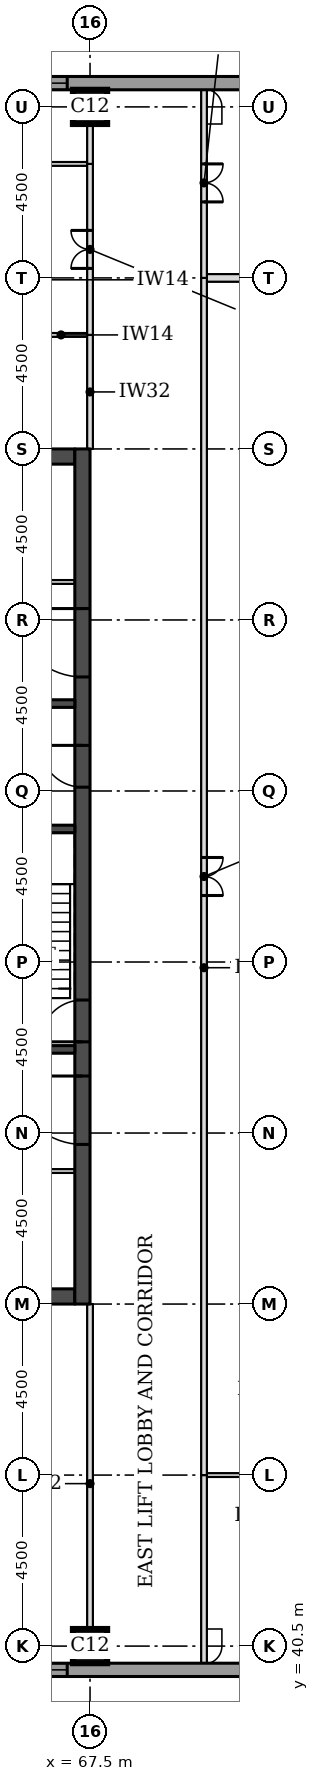
"""IFC4 building model, lengths in metres.
Left out: names, types, materials, properties, quantities, classifications, styles, units other than length and angle.
Written with IfcOpenShell. Run it as: python <this file> out.ifc"""

import sys

from ifc_helpers import new_model, si_unit, direction, frame, frame_2d, origin, origin_2d, place, context, subcontext, project, spatial, rectangle, extrude, element, fill, save


model = new_model("IFC4")
c1 = context("Model", 3, precision=1e-05, world=origin(), true_north=direction((0.0, 1.0)))
c2 = subcontext(c1, "Body", "Model", "MODEL_VIEW")
j1 = project(units=[si_unit("LENGTHUNIT", "METRE"), si_unit("PLANEANGLEUNIT", "RADIAN")], contexts=[c1])
p1 = place(None, origin())
s1 = spatial("IfcSite", under=j1, at=p1, CompositionType="ELEMENT")
p2 = place(p1, origin())
s2 = spatial("IfcBuilding", under=s1, at=p2, CompositionType="ELEMENT")
p3 = place(p2, frame((0.0, 0.0, 169.9)))
s3 = spatial("IfcBuildingStorey", under=s2, at=p3, CompositionType="ELEMENT", Elevation=169.9)
for number, where, z_axis, x_axis in (
    (1, (67.5, 40.5, 0.0), (0.0, 0.0, 1.0), (1.0, 0.0, 0.0)),
    (2, (67.5, 81.0, 0.0), (0.0, 0.0, 1.0), (1.0, 0.0, 0.0)),
):
    element("IfcColumn", number, at=place(p3, frame(where, z_axis=z_axis, x_axis=x_axis)), inside=s3, PredefinedType="COLUMN", context=c2, shape_type="SweptSolid", body=[
        extrude(rectangle(XDim=0.9, YDim=0.9, at=origin_2d()), origin(), (0.0, 0.0, 1.0), 3.7),
    ])
for number, where, z_axis, x_axis in (
    (3, (45.4, 49.7, 0.0), (0.0, 0.0, 1.0), (1.0, 0.0, 0.0)),
    (4, (45.4, 71.8, 0.0), (0.0, 0.0, 1.0), (1.0, 0.0, 0.0)),
):
    element("IfcWall", number, at=place(p3, frame(where, z_axis=z_axis, x_axis=x_axis)), inside=s3, PredefinedType="SHEAR", context=c2, shape_type="SweptSolid", body=[
        extrude(rectangle(XDim=21.7, YDim=0.4, at=frame_2d((10.85, 0.0))), origin(), (0.0, 0.0, 1.0), 3.7),
    ])
p4 = place(p3, frame((67.3, 49.5, 0.0), z_axis=(0.0, 0.0, 1.0), x_axis=(0.0, 1.0, 0.0)))
e5 = element("IfcWall", 5, at=p4, inside=s3, PredefinedType="SHEAR", context=c2, shape_type="SweptSolid", body=[
    extrude(rectangle(XDim=22.5, YDim=0.4, at=frame_2d((11.25, 0.0))), origin(), (0.0, 0.0, 1.0), 3.7),
])
p5 = place(p4, frame((4.2, 0.0, 0.0)))
e6 = element("IfcOpeningElement", 6, at=p5, cuts=e5, PredefinedType="OPENING", context=c2, shape_type="SweptSolid", body=[
    extrude(rectangle(XDim=1.8, YDim=2.1, at=frame_2d((0.9, 1.05))), frame((0.0, 0.21, 0.0), z_axis=(0.0, -1.0, 0.0), x_axis=(1.0, 0.0, 0.0)), (0.0, 0.0, 1.0), 0.42),
])
p6 = place(p4, frame((6.9, 0.0, 0.0)))
e7 = element("IfcOpeningElement", 7, at=p6, cuts=e5, PredefinedType="OPENING", context=c2, shape_type="SweptSolid", body=[
    extrude(rectangle(XDim=1.1, YDim=2.1, at=frame_2d((0.55, 1.05))), frame((0.0, 0.21, 0.0), z_axis=(0.0, -1.0, 0.0), x_axis=(1.0, 0.0, 0.0)), (0.0, 0.0, 1.0), 0.42),
])
p7 = place(p4, frame((13.6, 0.0, 0.0)))
e8 = element("IfcOpeningElement", 8, at=p7, cuts=e5, PredefinedType="OPENING", context=c2, shape_type="SweptSolid", body=[
    extrude(rectangle(XDim=1.1, YDim=2.1, at=frame_2d((0.55, 1.05))), frame((0.0, 0.21, 0.0), z_axis=(0.0, -1.0, 0.0), x_axis=(1.0, 0.0, 0.0)), (0.0, 0.0, 1.0), 0.42),
])
p8 = place(p4, frame((16.5, 0.0, 0.0)))
e9 = element("IfcOpeningElement", 9, at=p8, cuts=e5, PredefinedType="OPENING", context=c2, shape_type="SweptSolid", body=[
    extrude(rectangle(XDim=1.8, YDim=2.1, at=frame_2d((0.9, 1.05))), frame((0.0, 0.21, 0.0), z_axis=(0.0, -1.0, 0.0), x_axis=(1.0, 0.0, 0.0)), (0.0, 0.0, 1.0), 0.42),
])
p9 = place(p3, frame((36.0, 39.875, 0.0), z_axis=(0.0, 0.0, 1.0), x_axis=(1.0, 0.0, 0.0)))
e10 = element("IfcWall", 10, at=p9, inside=s3, PredefinedType="STANDARD", context=c2, shape_type="SweptSolid", body=[
    extrude(rectangle(XDim=36.331, YDim=0.35, at=frame_2d((18.166, 0.0))), origin(), (0.0, 0.0, 1.0), 3.525),
])
p10 = place(p9, frame((5.1, 0.0, 0.9)))
e11 = element("IfcOpeningElement", 11, at=p10, cuts=e10, PredefinedType="OPENING", context=c2, shape_type="SweptSolid", body=[
    extrude(rectangle(XDim=3.3, YDim=1.9, at=frame_2d((1.65, 0.95))), frame((0.0, 0.185, 0.0), z_axis=(0.0, -1.0, 0.0), x_axis=(1.0, 0.0, 0.0)), (0.0, 0.0, 1.0), 0.37),
])
p11 = place(p9, frame((9.6, 0.0, 0.9)))
e12 = element("IfcOpeningElement", 12, at=p11, cuts=e10, PredefinedType="OPENING", context=c2, shape_type="SweptSolid", body=[
    extrude(rectangle(XDim=3.3, YDim=1.9, at=frame_2d((1.65, 0.95))), frame((0.0, 0.185, 0.0), z_axis=(0.0, -1.0, 0.0), x_axis=(1.0, 0.0, 0.0)), (0.0, 0.0, 1.0), 0.37),
])
p12 = place(p9, frame((14.1, 0.0, 0.9)))
e13 = element("IfcOpeningElement", 13, at=p12, cuts=e10, PredefinedType="OPENING", context=c2, shape_type="SweptSolid", body=[
    extrude(rectangle(XDim=3.3, YDim=1.9, at=frame_2d((1.65, 0.95))), frame((0.0, 0.185, 0.0), z_axis=(0.0, -1.0, 0.0), x_axis=(1.0, 0.0, 0.0)), (0.0, 0.0, 1.0), 0.37),
])
p13 = place(p9, frame((18.6, 0.0, 0.9)))
e14 = element("IfcOpeningElement", 14, at=p13, cuts=e10, PredefinedType="OPENING", context=c2, shape_type="SweptSolid", body=[
    extrude(rectangle(XDim=3.3, YDim=1.9, at=frame_2d((1.65, 0.95))), frame((0.0, 0.185, 0.0), z_axis=(0.0, -1.0, 0.0), x_axis=(1.0, 0.0, 0.0)), (0.0, 0.0, 1.0), 0.37),
])
p14 = place(p9, frame((23.1, 0.0, 0.9)))
e15 = element("IfcOpeningElement", 15, at=p14, cuts=e10, PredefinedType="OPENING", context=c2, shape_type="SweptSolid", body=[
    extrude(rectangle(XDim=3.3, YDim=1.9, at=frame_2d((1.65, 0.95))), frame((0.0, 0.185, 0.0), z_axis=(0.0, -1.0, 0.0), x_axis=(1.0, 0.0, 0.0)), (0.0, 0.0, 1.0), 0.37),
])
p15 = place(p9, frame((27.6, 0.0, 0.9)))
e16 = element("IfcOpeningElement", 16, at=p15, cuts=e10, PredefinedType="OPENING", context=c2, shape_type="SweptSolid", body=[
    extrude(rectangle(XDim=3.3, YDim=1.9, at=frame_2d((1.65, 0.95))), frame((0.0, 0.185, 0.0), z_axis=(0.0, -1.0, 0.0), x_axis=(1.0, 0.0, 0.0)), (0.0, 0.0, 1.0), 0.37),
])
p16 = place(p3, frame((72.331, 81.625, 0.0), z_axis=(0.0, 0.0, 1.0), x_axis=(-1.0, 0.0, 0.0)))
e17 = element("IfcWall", 17, at=p16, inside=s3, PredefinedType="STANDARD", context=c2, shape_type="SweptSolid", body=[
    extrude(rectangle(XDim=32.163, YDim=0.35, at=frame_2d((16.081, 0.0))), origin(), (0.0, 0.0, 1.0), 3.525),
])
p17 = place(p16, frame((5.431, 0.0, 0.9)))
e18 = element("IfcOpeningElement", 18, at=p17, cuts=e17, PredefinedType="OPENING", context=c2, shape_type="SweptSolid", body=[
    extrude(rectangle(XDim=3.3, YDim=1.9, at=frame_2d((1.65, 0.95))), frame((0.0, 0.185, 0.0), z_axis=(0.0, -1.0, 0.0), x_axis=(1.0, 0.0, 0.0)), (0.0, 0.0, 1.0), 0.37),
])
p18 = place(p16, frame((9.931, 0.0, 0.9)))
e19 = element("IfcOpeningElement", 19, at=p18, cuts=e17, PredefinedType="OPENING", context=c2, shape_type="SweptSolid", body=[
    extrude(rectangle(XDim=3.3, YDim=1.9, at=frame_2d((1.65, 0.95))), frame((0.0, 0.185, 0.0), z_axis=(0.0, -1.0, 0.0), x_axis=(1.0, 0.0, 0.0)), (0.0, 0.0, 1.0), 0.37),
])
p19 = place(p16, frame((14.431, 0.0, 0.9)))
e20 = element("IfcOpeningElement", 20, at=p19, cuts=e17, PredefinedType="OPENING", context=c2, shape_type="SweptSolid", body=[
    extrude(rectangle(XDim=3.3, YDim=1.9, at=frame_2d((1.65, 0.95))), frame((0.0, 0.185, 0.0), z_axis=(0.0, -1.0, 0.0), x_axis=(1.0, 0.0, 0.0)), (0.0, 0.0, 1.0), 0.37),
])
p20 = place(p16, frame((18.931, 0.0, 0.9)))
e21 = element("IfcOpeningElement", 21, at=p20, cuts=e17, PredefinedType="OPENING", context=c2, shape_type="SweptSolid", body=[
    extrude(rectangle(XDim=3.3, YDim=1.9, at=frame_2d((1.65, 0.95))), frame((0.0, 0.185, 0.0), z_axis=(0.0, -1.0, 0.0), x_axis=(1.0, 0.0, 0.0)), (0.0, 0.0, 1.0), 0.37),
])
p21 = place(p16, frame((23.431, 0.0, 0.9)))
e22 = element("IfcOpeningElement", 22, at=p21, cuts=e17, PredefinedType="OPENING", context=c2, shape_type="SweptSolid", body=[
    extrude(rectangle(XDim=3.3, YDim=1.9, at=frame_2d((1.65, 0.95))), frame((0.0, 0.185, 0.0), z_axis=(0.0, -1.0, 0.0), x_axis=(1.0, 0.0, 0.0)), (0.0, 0.0, 1.0), 0.37),
])
p22 = place(p3, frame((70.575, 45.0, 0.0), z_axis=(0.0, 0.0, 1.0), x_axis=(1.0, 0.0, 0.0)))
e23 = element("IfcWall", 23, at=p22, inside=s3, PredefinedType="PARTITIONING", context=c2, shape_type="SweptSolid", body=[
    extrude(rectangle(XDim=2.925, YDim=0.1, at=frame_2d((1.462, 0.0))), origin(), (0.0, 0.0, 1.0), 3.096),
])
p23 = place(p22, frame((1.0, 0.0, 0.0)))
e24 = element("IfcOpeningElement", 24, at=p23, cuts=e23, PredefinedType="OPENING", context=c2, shape_type="SweptSolid", body=[
    extrude(rectangle(XDim=0.9, YDim=2.1, at=frame_2d((0.45, 1.05))), frame((0.0, 0.06, 0.0), z_axis=(0.0, -1.0, 0.0), x_axis=(1.0, 0.0, 0.0)), (0.0, 0.0, 1.0), 0.12),
])
p24 = place(p3, frame((64.45, 75.0, 0.0), z_axis=(0.0, 0.0, 1.0), x_axis=(1.0, 0.0, 0.0)))
e25 = element("IfcWall", 25, at=p24, inside=s3, PredefinedType="PARTITIONING", context=c2, shape_type="SweptSolid", body=[
    extrude(rectangle(XDim=2.975, YDim=0.1, at=frame_2d((1.488, 0.0))), origin(), (0.0, 0.0, 1.0), 3.55),
])
p25 = place(p3, frame((70.575, 76.5, 0.0), z_axis=(0.0, 0.0, 1.0), x_axis=(1.0, 0.0, 0.0)))
e26 = element("IfcWall", 26, at=p25, inside=s3, PredefinedType="PARTITIONING", context=c2, shape_type="SweptSolid", body=[
    extrude(rectangle(XDim=5.475, YDim=0.2, at=frame_2d((2.738, 0.0))), origin(), (0.0, 0.0, 1.0), 3.096),
])
p26 = place(p3, frame((64.45, 79.5, 0.0), z_axis=(0.0, 0.0, 1.0), x_axis=(1.0, 0.0, 0.0)))
e27 = element("IfcWall", 27, at=p26, inside=s3, PredefinedType="PARTITIONING", context=c2, shape_type="SweptSolid", body=[
    extrude(rectangle(XDim=2.975, YDim=0.1, at=frame_2d((1.488, 0.0))), origin(), (0.0, 0.0, 1.0), 3.55),
])
p27 = place(p3, frame((67.5, 40.05, 0.0), z_axis=(0.0, 0.0, 1.0), x_axis=(0.0, 1.0, 0.0)))
e28 = element("IfcWall", 28, at=p27, inside=s3, PredefinedType="PARTITIONING", context=c2, shape_type="SweptSolid", body=[
    extrude(rectangle(XDim=9.45, YDim=0.15, at=frame_2d((4.725, 0.0))), origin(), (0.0, 0.0, 1.0), 3.022),
])
p28 = place(p3, frame((70.5, 40.05, 0.0), z_axis=(0.0, 0.0, 1.0), x_axis=(0.0, 1.0, 0.0)))
e29 = element("IfcWall", 29, at=p28, inside=s3, PredefinedType="PARTITIONING", context=c2, shape_type="SweptSolid", body=[
    extrude(rectangle(XDim=4.95, YDim=0.15, at=frame_2d((2.475, 0.0))), origin(), (0.0, 0.0, 1.0), 3.55),
])
p29 = place(p3, frame((70.5, 45.0, 0.0), z_axis=(0.0, 0.0, 1.0), x_axis=(0.0, 1.0, 0.0)))
e30 = element("IfcWall", 30, at=p29, inside=s3, PredefinedType="PARTITIONING", context=c2, shape_type="SweptSolid", body=[
    extrude(rectangle(XDim=31.5, YDim=0.15, at=frame_2d((15.75, 0.0))), origin(), (0.0, 0.0, 1.0), 3.55),
])
p30 = place(p29, frame((15.25, 0.0, 0.0)))
e31 = element("IfcOpeningElement", 31, at=p30, cuts=e30, PredefinedType="OPENING", context=c2, shape_type="SweptSolid", body=[
    extrude(rectangle(XDim=1.0, YDim=2.1, at=frame_2d((0.5, 1.05))), frame((0.0, 0.085, 0.0), z_axis=(0.0, -1.0, 0.0), x_axis=(1.0, 0.0, 0.0)), (0.0, 0.0, 1.0), 0.17),
])
p31 = place(p3, frame((67.5, 72.0, 0.0), z_axis=(0.0, 0.0, 1.0), x_axis=(0.0, 1.0, 0.0)))
e32 = element("IfcWall", 32, at=p31, inside=s3, PredefinedType="PARTITIONING", context=c2, shape_type="SweptSolid", body=[
    extrude(rectangle(XDim=3.0, YDim=0.15, at=frame_2d((1.5, 0.0))), origin(), (0.0, 0.0, 1.0), 3.022),
])
p32 = place(p3, frame((67.5, 75.0, 0.0), z_axis=(0.0, 0.0, 1.0), x_axis=(0.0, 1.0, 0.0)))
e33 = element("IfcWall", 33, at=p32, inside=s3, PredefinedType="PARTITIONING", context=c2, shape_type="SweptSolid", body=[
    extrude(rectangle(XDim=4.5, YDim=0.15, at=frame_2d((2.25, 0.0))), origin(), (0.0, 0.0, 1.0), 3.022),
])
p33 = place(p32, frame((1.75, 0.0, 0.0)))
e34 = element("IfcOpeningElement", 34, at=p33, cuts=e33, PredefinedType="OPENING", context=c2, shape_type="SweptSolid", body=[
    extrude(rectangle(XDim=1.0, YDim=2.1, at=frame_2d((0.5, 1.05))), frame((0.0, 0.085, 0.0), z_axis=(0.0, -1.0, 0.0), x_axis=(1.0, 0.0, 0.0)), (0.0, 0.0, 1.0), 0.17),
])
p34 = place(p3, frame((70.5, 76.5, 0.0), z_axis=(0.0, 0.0, 1.0), x_axis=(0.0, 1.0, 0.0)))
e35 = element("IfcWall", 35, at=p34, inside=s3, PredefinedType="PARTITIONING", context=c2, shape_type="SweptSolid", body=[
    extrude(rectangle(XDim=4.95, YDim=0.15, at=frame_2d((2.475, 0.0))), origin(), (0.0, 0.0, 1.0), 3.55),
])
p35 = place(p34, frame((2.0, 0.0, 0.0)))
e36 = element("IfcOpeningElement", 36, at=p35, cuts=e35, PredefinedType="OPENING", context=c2, shape_type="SweptSolid", body=[
    extrude(rectangle(XDim=1.0, YDim=2.1, at=frame_2d((0.5, 1.05))), frame((0.0, 0.085, 0.0), z_axis=(0.0, -1.0, 0.0), x_axis=(1.0, 0.0, 0.0)), (0.0, 0.0, 1.0), 0.17),
])
p36 = place(p3, frame((67.5, 79.5, 0.0), z_axis=(0.0, 0.0, 1.0), x_axis=(0.0, 1.0, 0.0)))
e37 = element("IfcWall", 37, at=p36, inside=s3, PredefinedType="PARTITIONING", context=c2, shape_type="SweptSolid", body=[
    extrude(rectangle(XDim=1.95, YDim=0.15, at=frame_2d((0.975, 0.0))), origin(), (0.0, 0.0, 1.0), 3.022),
])
p37 = place(p3, frame((45.4, 53.0, 0.0), z_axis=(0.0, 0.0, 1.0), x_axis=(1.0, 0.0, 0.0)))
e38 = element("IfcWall", 38, at=p37, inside=s3, PredefinedType="PARTITIONING", context=c2, shape_type="SweptSolid", body=[
    extrude(rectangle(XDim=21.7, YDim=0.1, at=frame_2d((10.85, 0.0))), origin(), (0.0, 0.0, 1.0), 3.55),
])
p38 = place(p37, frame((18.625, 0.0, 0.0)))
e39 = element("IfcOpeningElement", 39, at=p38, cuts=e38, PredefinedType="OPENING", context=c2, shape_type="SweptSolid", body=[
    extrude(rectangle(XDim=0.9, YDim=2.1, at=frame_2d((0.45, 1.05))), frame((0.0, 0.06, 0.0), z_axis=(0.0, -1.0, 0.0), x_axis=(1.0, 0.0, 0.0)), (0.0, 0.0, 1.0), 0.12),
])
p39 = place(p37, frame((0.393, 0.0, 0.0)))
e40 = element("IfcOpeningElement", 40, at=p39, cuts=e38, PredefinedType="OPENING", context=c2, shape_type="SweptSolid", body=[
    extrude(rectangle(XDim=1.0, YDim=2.1, at=frame_2d((0.5, 1.05))), frame((0.0, 0.06, 0.0), z_axis=(0.0, -1.0, 0.0), x_axis=(1.0, 0.0, 0.0)), (0.0, 0.0, 1.0), 0.12),
])
p40 = place(p37, frame((2.201, 0.0, 0.0)))
e41 = element("IfcOpeningElement", 41, at=p40, cuts=e38, PredefinedType="OPENING", context=c2, shape_type="SweptSolid", body=[
    extrude(rectangle(XDim=0.9, YDim=2.1, at=frame_2d((0.45, 1.05))), frame((0.0, 0.06, 0.0), z_axis=(0.0, -1.0, 0.0), x_axis=(1.0, 0.0, 0.0)), (0.0, 0.0, 1.0), 0.12),
])
p41 = place(p37, frame((3.934, 0.0, 0.0)))
e42 = element("IfcOpeningElement", 42, at=p41, cuts=e38, PredefinedType="OPENING", context=c2, shape_type="SweptSolid", body=[
    extrude(rectangle(XDim=0.9, YDim=2.1, at=frame_2d((0.45, 1.05))), frame((0.0, 0.06, 0.0), z_axis=(0.0, -1.0, 0.0), x_axis=(1.0, 0.0, 0.0)), (0.0, 0.0, 1.0), 0.12),
])
p42 = place(p37, frame((7.88, 0.0, 0.0)))
e43 = element("IfcOpeningElement", 43, at=p42, cuts=e38, PredefinedType="OPENING", context=c2, shape_type="SweptSolid", body=[
    extrude(rectangle(XDim=0.9, YDim=2.1, at=frame_2d((0.45, 1.05))), frame((0.0, 0.06, 0.0), z_axis=(0.0, -1.0, 0.0), x_axis=(1.0, 0.0, 0.0)), (0.0, 0.0, 1.0), 0.12),
])
p43 = place(p37, frame((13.48, 0.0, 0.0)))
e44 = element("IfcOpeningElement", 44, at=p43, cuts=e38, PredefinedType="OPENING", context=c2, shape_type="SweptSolid", body=[
    extrude(rectangle(XDim=0.9, YDim=2.1, at=frame_2d((0.45, 1.05))), frame((0.0, 0.06, 0.0), z_axis=(0.0, -1.0, 0.0), x_axis=(1.0, 0.0, 0.0)), (0.0, 0.0, 1.0), 0.12),
])
p44 = place(p3, frame((63.9, 56.2, 0.0), z_axis=(0.0, 0.0, 1.0), x_axis=(1.0, 0.0, 0.0)))
e45 = element("IfcWall", 45, at=p44, inside=s3, PredefinedType="SOLIDWALL", context=c2, shape_type="SweptSolid", body=[
    extrude(rectangle(XDim=3.2, YDim=0.2, at=frame_2d((1.6, 0.0))), origin(), (0.0, 0.0, 1.0), 3.55),
])
p45 = place(p3, frame((61.85, 62.0, 0.0), z_axis=(0.0, 0.0, 1.0), x_axis=(1.0, 0.0, 0.0)))
e46 = element("IfcWall", 46, at=p45, inside=s3, PredefinedType="SOLIDWALL", context=c2, shape_type="SweptSolid", body=[
    extrude(rectangle(XDim=5.25, YDim=0.2, at=frame_2d((2.625, 0.0))), origin(), (0.0, 0.0, 1.0), 3.55),
])
p46 = place(p3, frame((64.7, 65.3, 0.0), z_axis=(0.0, 0.0, 1.0), x_axis=(1.0, 0.0, 0.0)))
e47 = element("IfcWall", 47, at=p46, inside=s3, PredefinedType="SOLIDWALL", context=c2, shape_type="SweptSolid", body=[
    extrude(rectangle(XDim=2.4, YDim=0.2, at=frame_2d((1.2, 0.0))), origin(), (0.0, 0.0, 1.0), 3.55),
])
p47 = place(p3, frame((45.4, 68.5, 0.0), z_axis=(0.0, 0.0, 1.0), x_axis=(1.0, 0.0, 0.0)))
e48 = element("IfcWall", 48, at=p47, inside=s3, PredefinedType="PARTITIONING", context=c2, shape_type="SweptSolid", body=[
    extrude(rectangle(XDim=21.7, YDim=0.1, at=frame_2d((10.85, 0.0))), origin(), (0.0, 0.0, 1.0), 3.55),
])
p48 = place(p47, frame((19.544, 0.0, 0.0)))
e49 = element("IfcOpeningElement", 49, at=p48, cuts=e48, PredefinedType="OPENING", context=c2, shape_type="SweptSolid", body=[
    extrude(rectangle(XDim=0.9, YDim=2.1, at=frame_2d((0.45, 1.05))), frame((0.0, 0.06, 0.0), z_axis=(0.0, -1.0, 0.0), x_axis=(1.0, 0.0, 0.0)), (0.0, 0.0, 1.0), 0.12),
])
p49 = place(p47, frame((16.919, 0.0, 0.0)))
e50 = element("IfcOpeningElement", 50, at=p49, cuts=e48, PredefinedType="OPENING", context=c2, shape_type="SweptSolid", body=[
    extrude(rectangle(XDim=0.9, YDim=2.1, at=frame_2d((0.45, 1.05))), frame((0.0, 0.06, 0.0), z_axis=(0.0, -1.0, 0.0), x_axis=(1.0, 0.0, 0.0)), (0.0, 0.0, 1.0), 0.12),
])
p50 = place(p47, frame((0.6, 0.0, 0.0)))
e51 = element("IfcOpeningElement", 51, at=p50, cuts=e48, PredefinedType="OPENING", context=c2, shape_type="SweptSolid", body=[
    extrude(rectangle(XDim=0.9, YDim=2.1, at=frame_2d((0.45, 1.05))), frame((0.0, 0.06, 0.0), z_axis=(0.0, -1.0, 0.0), x_axis=(1.0, 0.0, 0.0)), (0.0, 0.0, 1.0), 0.12),
])
p51 = place(p47, frame((3.225, 0.0, 0.0)))
e52 = element("IfcOpeningElement", 52, at=p51, cuts=e48, PredefinedType="OPENING", context=c2, shape_type="SweptSolid", body=[
    extrude(rectangle(XDim=0.9, YDim=2.1, at=frame_2d((0.45, 1.05))), frame((0.0, 0.06, 0.0), z_axis=(0.0, -1.0, 0.0), x_axis=(1.0, 0.0, 0.0)), (0.0, 0.0, 1.0), 0.12),
])
p52 = place(p47, frame((12.92, 0.0, 0.0)))
e53 = element("IfcOpeningElement", 53, at=p52, cuts=e48, PredefinedType="OPENING", context=c2, shape_type="SweptSolid", body=[
    extrude(rectangle(XDim=0.9, YDim=2.1, at=frame_2d((0.45, 1.05))), frame((0.0, 0.06, 0.0), z_axis=(0.0, -1.0, 0.0), x_axis=(1.0, 0.0, 0.0)), (0.0, 0.0, 1.0), 0.12),
])
p53 = place(p47, frame((7.32, 0.0, 0.0)))
e54 = element("IfcOpeningElement", 54, at=p53, cuts=e48, PredefinedType="OPENING", context=c2, shape_type="SweptSolid", body=[
    extrude(rectangle(XDim=0.9, YDim=2.1, at=frame_2d((0.45, 1.05))), frame((0.0, 0.06, 0.0), z_axis=(0.0, -1.0, 0.0), x_axis=(1.0, 0.0, 0.0)), (0.0, 0.0, 1.0), 0.12),
])
p54 = place(p15, origin())
e55 = element("IfcWindow", 55, at=p54, inside=s3, PartitioningType="SINGLE_PANEL", PredefinedType="WINDOW", context=c2, shape_type="SweptSolid", body=[
    extrude(rectangle(XDim=3.3, YDim=1.9, at=frame_2d((1.65, 0.95))), frame((0.0, 0.085, 0.0), z_axis=(0.0, -1.0, 0.0), x_axis=(1.0, 0.0, 0.0)), (0.0, 0.0, 1.0), 0.06),
])
fill(e16, e55)
p55 = place(p17, origin())
e56 = element("IfcWindow", 56, at=p55, inside=s3, PartitioningType="SINGLE_PANEL", PredefinedType="WINDOW", context=c2, shape_type="SweptSolid", body=[
    extrude(rectangle(XDim=3.3, YDim=1.9, at=frame_2d((1.65, 0.95))), frame((0.0, 0.085, 0.0), z_axis=(0.0, -1.0, 0.0), x_axis=(1.0, 0.0, 0.0)), (0.0, 0.0, 1.0), 0.06),
])
fill(e18, e56)
p56 = place(p33, origin())
e57 = element("IfcDoor", 57, at=p56, inside=s3, OperationType="DOUBLE_DOOR_SINGLE_SWING", PredefinedType="DOOR", context=c2, shape_type="SweptSolid", body=[
    extrude(rectangle(XDim=1.0, YDim=2.1, at=frame_2d((0.5, 1.05))), frame((0.0, 0.025, 0.0), z_axis=(0.0, -1.0, 0.0), x_axis=(1.0, 0.0, 0.0)), (0.0, 0.0, 1.0), 0.05),
])
fill(e34, e57)
p57 = place(p30, frame((1.0, 0.0, 0.0), z_axis=(0.0, 0.0, 1.0), x_axis=(-1.0, 0.0, 0.0)))
e58 = element("IfcDoor", 58, at=p57, inside=s3, OperationType="DOUBLE_DOOR_SINGLE_SWING", PredefinedType="DOOR", context=c2, shape_type="SweptSolid", body=[
    extrude(rectangle(XDim=1.0, YDim=2.1, at=frame_2d((0.5, 1.05))), frame((0.0, 0.025, 0.0), z_axis=(0.0, -1.0, 0.0), x_axis=(1.0, 0.0, 0.0)), (0.0, 0.0, 1.0), 0.05),
])
fill(e31, e58)
p58 = place(p35, frame((1.0, 0.0, 0.0), z_axis=(0.0, 0.0, 1.0), x_axis=(-1.0, 0.0, 0.0)))
e59 = element("IfcDoor", 59, at=p58, inside=s3, OperationType="DOUBLE_DOOR_SINGLE_SWING", PredefinedType="DOOR", context=c2, shape_type="SweptSolid", body=[
    extrude(rectangle(XDim=1.0, YDim=2.1, at=frame_2d((0.5, 1.05))), frame((0.0, 0.025, 0.0), z_axis=(0.0, -1.0, 0.0), x_axis=(1.0, 0.0, 0.0)), (0.0, 0.0, 1.0), 0.05),
])
fill(e36, e59)
p59 = place(p5, origin())
e60 = element("IfcDoor", 60, at=p59, inside=s3, OperationType="SINGLE_SWING_RIGHT", PredefinedType="DOOR", context=c2, shape_type="SweptSolid", body=[
    extrude(rectangle(XDim=1.8, YDim=2.1, at=frame_2d((0.9, 1.05))), frame((0.0, 0.025, 0.0), z_axis=(0.0, -1.0, 0.0), x_axis=(1.0, 0.0, 0.0)), (0.0, 0.0, 1.0), 0.05),
])
fill(e6, e60)
p60 = place(p6, origin())
e61 = element("IfcDoor", 61, at=p60, inside=s3, OperationType="SINGLE_SWING_LEFT", PredefinedType="DOOR", context=c2, shape_type="SweptSolid", body=[
    extrude(rectangle(XDim=1.1, YDim=2.1, at=frame_2d((0.55, 1.05))), frame((0.0, 0.025, 0.0), z_axis=(0.0, -1.0, 0.0), x_axis=(1.0, 0.0, 0.0)), (0.0, 0.0, 1.0), 0.05),
])
fill(e7, e61)
p61 = place(p7, origin())
e62 = element("IfcDoor", 62, at=p61, inside=s3, OperationType="SINGLE_SWING_RIGHT", PredefinedType="DOOR", context=c2, shape_type="SweptSolid", body=[
    extrude(rectangle(XDim=1.1, YDim=2.1, at=frame_2d((0.55, 1.05))), frame((0.0, 0.025, 0.0), z_axis=(0.0, -1.0, 0.0), x_axis=(1.0, 0.0, 0.0)), (0.0, 0.0, 1.0), 0.05),
])
fill(e8, e62)
p62 = place(p8, origin())
e63 = element("IfcDoor", 63, at=p62, inside=s3, OperationType="SINGLE_SWING_RIGHT", PredefinedType="DOOR", context=c2, shape_type="SweptSolid", body=[
    extrude(rectangle(XDim=1.8, YDim=2.1, at=frame_2d((0.9, 1.05))), frame((0.0, 0.025, 0.0), z_axis=(0.0, -1.0, 0.0), x_axis=(1.0, 0.0, 0.0)), (0.0, 0.0, 1.0), 0.05),
])
fill(e9, e63)
save(model, sys.argv[1])
